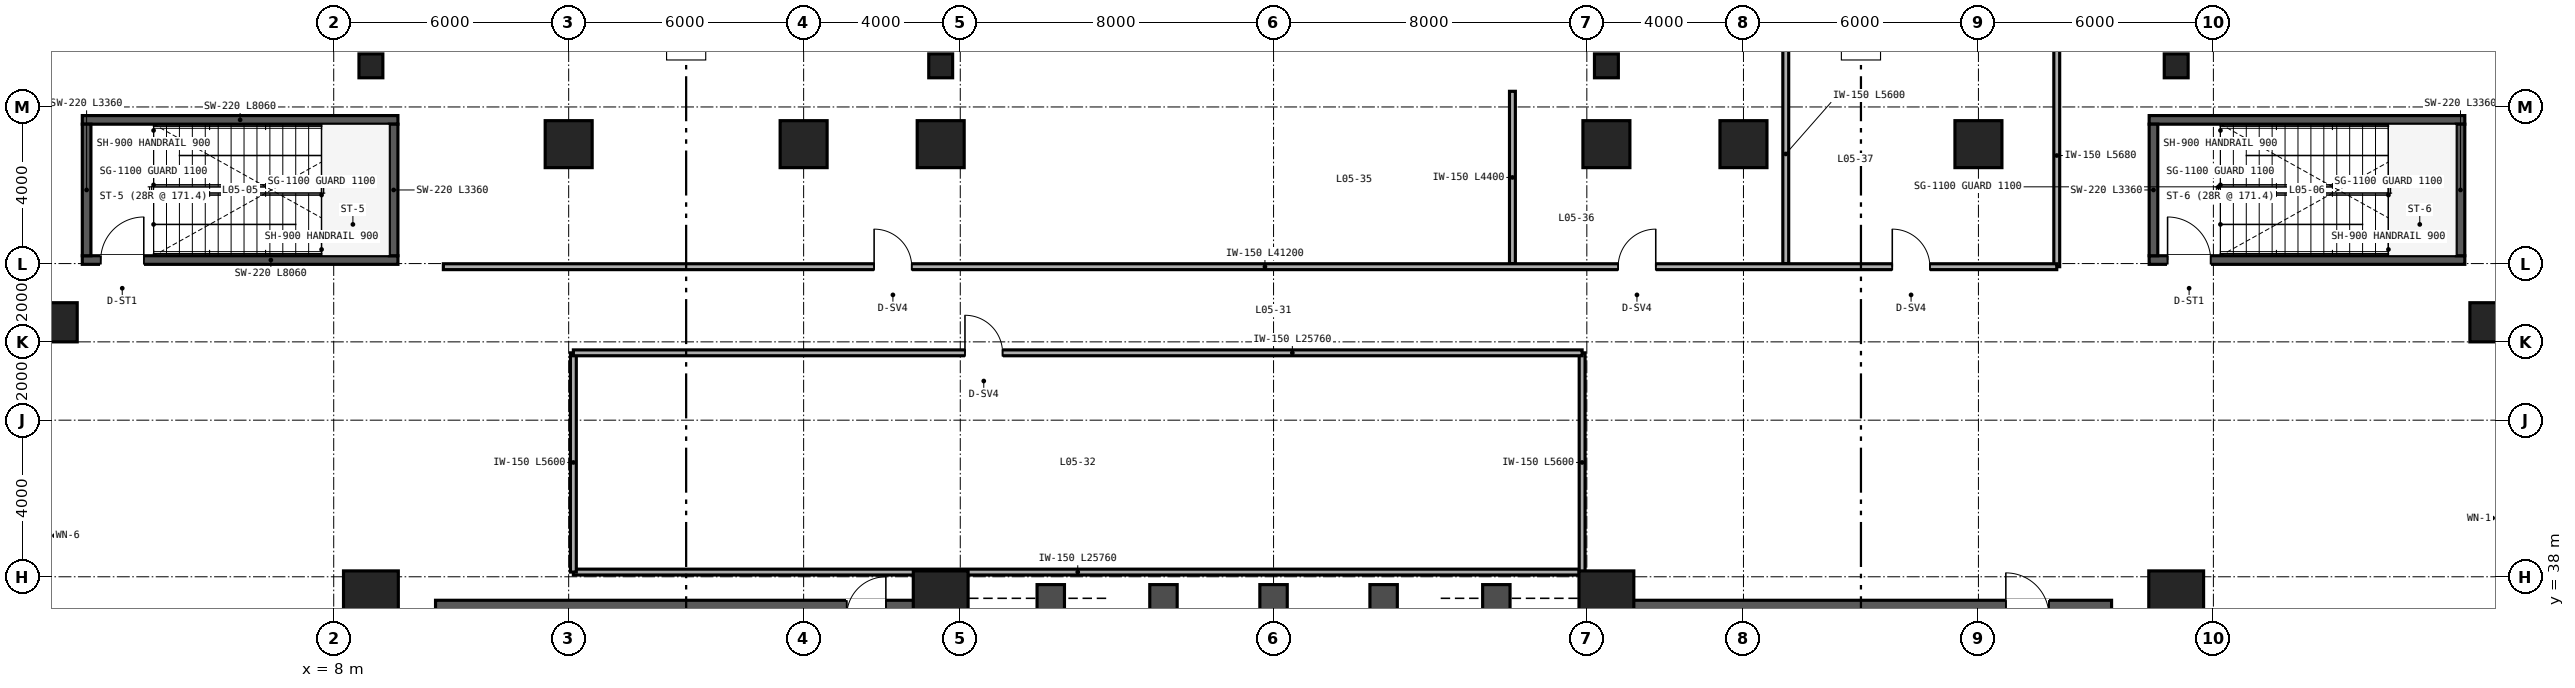
"""IFC4 building model, lengths in metres.
Left out: names, types, materials, properties, quantities, classifications, styles, units other than length and angle.
Written with IfcOpenShell. Run it as: python <this file> out.ifc"""

import sys

from ifc_helpers import new_model, si_unit, direction, frame, frame_2d, origin, origin_2d, place, context, subcontext, project, spatial, rectangle, hollow_circle, extrude, source, transform, mapped, element, fill, save


model = new_model("IFC4")
c1 = context("Model", 3, precision=1e-05, world=origin(), true_north=direction((0.0, 1.0)))
c2 = subcontext(c1, "Body", "Model", "MODEL_VIEW")
j1 = project(units=[si_unit("LENGTHUNIT", "METRE"), si_unit("PLANEANGLEUNIT", "RADIAN")], contexts=[c1])
p1 = place(None, origin())
s1 = spatial("IfcSite", under=j1, at=p1, CompositionType="ELEMENT")
p2 = place(p1, origin())
s2 = spatial("IfcBuilding", under=s1, at=p2, CompositionType="ELEMENT")
p3 = place(p2, frame((0.0, 0.0, 24.0)))
s3 = spatial("IfcBuildingStorey", under=s2, at=p3, CompositionType="ELEMENT", Elevation=24.0)
p4 = place(p3, frame((10.6, 37.0, 0.0), z_axis=(0.0, 0.0, 1.0), x_axis=(1.0, 0.0, 0.0)))
e1 = element("IfcWall", 1, at=p4, inside=s3, PredefinedType="SHEAR", context=c2, shape_type="SweptSolid", body=[
    extrude(rectangle(XDim=12.8, YDim=0.8, at=frame_2d((6.4, 0.0))), origin(), (0.0, 0.0, 1.0), 4.48),
])
p5 = place(p4, frame((10.5, 0.0, 0.0)))
e2 = element("IfcOpeningElement", 2, at=p5, cuts=e1, PredefinedType="OPENING", context=c2, shape_type="SweptSolid", body=[
    extrude(rectangle(XDim=1.0, YDim=2.15, at=frame_2d((0.5, 1.075))), frame((0.0, 0.41, 0.0), z_axis=(0.0, -1.0, 0.0), x_axis=(1.0, 0.0, 0.0)), (0.0, 0.0, 1.0), 0.82),
])
p6 = place(p3, frame((40.6, 37.0, 0.0), z_axis=(0.0, 0.0, 1.0), x_axis=(1.0, 0.0, 0.0)))
e3 = element("IfcWall", 3, at=p6, inside=s3, PredefinedType="SHEAR", context=c2, shape_type="SweptSolid", body=[
    extrude(rectangle(XDim=12.8, YDim=0.8, at=frame_2d((6.4, 0.0))), origin(), (0.0, 0.0, 1.0), 4.48),
])
p7 = place(p6, frame((10.1, 0.0, 0.0)))
e4 = element("IfcOpeningElement", 4, at=p7, cuts=e3, PredefinedType="OPENING", context=c2, shape_type="SweptSolid", body=[
    extrude(rectangle(XDim=1.1, YDim=2.15, at=frame_2d((0.55, 1.075))), frame((0.0, 0.41, 0.0), z_axis=(0.0, -1.0, 0.0), x_axis=(1.0, 0.0, 0.0)), (0.0, 0.0, 1.0), 0.82),
])
p8 = place(p3, frame((1.58, 46.09, 0.0), z_axis=(0.0, 0.0, 1.0), x_axis=(1.0, 0.0, 0.0)))
e5 = element("IfcWall", 5, at=p8, inside=s3, PredefinedType="SHEAR", context=c2, shape_type="SweptSolid", body=[
    extrude(rectangle(XDim=8.06, YDim=0.22, at=frame_2d((4.03, 0.0))), origin(), (0.0, 0.0, 1.0), 4.6),
])
p9 = place(p8, frame((0.47, 0.0, 0.0)))
e6 = element("IfcOpeningElement", 6, at=p9, cuts=e5, PredefinedType="OPENING", context=c2, shape_type="SweptSolid", body=[
    extrude(rectangle(XDim=1.1, YDim=2.15, at=frame_2d((0.55, 1.075))), frame((0.0, 0.12, 0.0), z_axis=(0.0, -1.0, 0.0), x_axis=(1.0, 0.0, 0.0)), (0.0, 0.0, 1.0), 0.24),
])
p10 = place(p3, frame((1.58, 49.67, 0.0), z_axis=(0.0, 0.0, 1.0), x_axis=(1.0, 0.0, 0.0)))
e7 = element("IfcWall", 7, at=p10, inside=s3, PredefinedType="SHEAR", context=c2, shape_type="SweptSolid", body=[
    extrude(rectangle(XDim=8.06, YDim=0.22, at=frame_2d((4.03, 0.0))), origin(), (0.0, 0.0, 1.0), 4.6),
])
for number, where, z_axis, x_axis in (
    (8, (1.69, 46.2, 0.0), (0.0, 0.0, 1.0), (0.0, 1.0, 0.0)),
    (9, (9.53, 46.2, 0.0), (0.0, 0.0, 1.0), (0.0, 1.0, 0.0)),
):
    element("IfcWall", number, at=place(p3, frame(where, z_axis=z_axis, x_axis=x_axis)), inside=s3, PredefinedType="SHEAR", context=c2, shape_type="SweptSolid", body=[
        extrude(rectangle(XDim=3.36, YDim=0.22, at=frame_2d((1.68, 0.0))), origin(), (0.0, 0.0, 1.0), 4.6),
    ])
p11 = place(p3, frame((54.36, 46.09, 0.0), z_axis=(0.0, 0.0, 1.0), x_axis=(1.0, 0.0, 0.0)))
e10 = element("IfcWall", 10, at=p11, inside=s3, PredefinedType="SHEAR", context=c2, shape_type="SweptSolid", body=[
    extrude(rectangle(XDim=8.06, YDim=0.22, at=frame_2d((4.03, 0.0))), origin(), (0.0, 0.0, 1.0), 4.6),
])
p12 = place(p11, frame((0.47, 0.0, 0.0)))
e11 = element("IfcOpeningElement", 11, at=p12, cuts=e10, PredefinedType="OPENING", context=c2, shape_type="SweptSolid", body=[
    extrude(rectangle(XDim=1.1, YDim=2.15, at=frame_2d((0.55, 1.075))), frame((0.0, 0.12, 0.0), z_axis=(0.0, -1.0, 0.0), x_axis=(1.0, 0.0, 0.0)), (0.0, 0.0, 1.0), 0.24),
])
p13 = place(p3, frame((54.36, 49.67, 0.0), z_axis=(0.0, 0.0, 1.0), x_axis=(1.0, 0.0, 0.0)))
e12 = element("IfcWall", 12, at=p13, inside=s3, PredefinedType="SHEAR", context=c2, shape_type="SweptSolid", body=[
    extrude(rectangle(XDim=8.06, YDim=0.22, at=frame_2d((4.03, 0.0))), origin(), (0.0, 0.0, 1.0), 4.6),
])
for number, where, z_axis, x_axis in (
    (13, (54.47, 46.2, 0.0), (0.0, 0.0, 1.0), (0.0, 1.0, 0.0)),
    (14, (62.31, 46.2, 0.0), (0.0, 0.0, 1.0), (0.0, 1.0, 0.0)),
):
    element("IfcWall", number, at=place(p3, frame(where, z_axis=z_axis, x_axis=x_axis)), inside=s3, PredefinedType="SHEAR", context=c2, shape_type="SweptSolid", body=[
        extrude(rectangle(XDim=3.36, YDim=0.22, at=frame_2d((1.68, 0.0))), origin(), (0.0, 0.0, 1.0), 4.6),
    ])
m1 = source(origin(), c2, "Body", "SweptSolid", [
    extrude(rectangle(XDim=1.0, YDim=1.0, at=origin_2d()), origin(), (0.0, 0.0, 1.0), 4.48),
])
for number, where, z_axis, x_axis in (
    (15, (0.95, 44.5, 0.0), (0.0, 0.0, 1.0), (1.0, 0.0, 0.0)),
    (16, (63.05, 44.5, 0.0), (0.0, 0.0, 1.0), (1.0, 0.0, 0.0)),
):
    element("IfcColumn", number, at=place(p3, frame(where, z_axis=z_axis, x_axis=x_axis)), inside=s3, PredefinedType="COLUMN", context=c2, shape_type="MappedRepresentation", body=[
        mapped(m1, transform((0.0, 0.0, 0.0), scale=1.0)),
    ])
m2 = source(origin(), c2, "Body", "SweptSolid", [
    extrude(hollow_circle(Radius=0.305, WallThickness=0.025, at=origin_2d()), origin(), (0.0, 0.0, 1.0), 4.48),
])
for number, where, z_axis, x_axis in (
    (17, (8.95, 51.05, 0.0), (0.0, 0.0, 1.0), (1.0, 0.0, 0.0)),
    (18, (23.5, 51.05, 0.0), (0.0, 0.0, 1.0), (1.0, 0.0, 0.0)),
    (19, (40.5, 51.05, 0.0), (0.0, 0.0, 1.0), (1.0, 0.0, 0.0)),
    (20, (55.05, 51.05, 0.0), (0.0, 0.0, 1.0), (1.0, 0.0, 0.0)),
):
    element("IfcColumn", number, at=place(p3, frame(where, z_axis=z_axis, x_axis=x_axis)), inside=s3, PredefinedType="COLUMN", context=c2, shape_type="MappedRepresentation", body=[
        mapped(m2, transform((0.0, 0.0, 0.0), scale=1.0)),
    ])
m3 = source(origin(), c2, "Body", "SweptSolid", [
    extrude(rectangle(XDim=1.4, YDim=1.4, at=origin_2d()), origin(), (0.0, 0.0, 1.0), 4.48),
])
for number, where, z_axis, x_axis in (
    (21, (8.95, 37.45, 0.0), (0.0, 0.0, 1.0), (1.0, 0.0, 0.0)),
    (22, (23.5, 37.45, 0.0), (0.0, 0.0, 1.0), (1.0, 0.0, 0.0)),
    (23, (40.5, 37.45, 0.0), (0.0, 0.0, 1.0), (1.0, 0.0, 0.0)),
    (24, (55.05, 37.45, 0.0), (0.0, 0.0, 1.0), (1.0, 0.0, 0.0)),
):
    element("IfcColumn", number, at=place(p3, frame(where, z_axis=z_axis, x_axis=x_axis)), inside=s3, PredefinedType="COLUMN", context=c2, shape_type="MappedRepresentation", body=[
        mapped(m3, transform((0.0, 0.0, 0.0), scale=1.0)),
    ])
m4 = source(origin(), c2, "Body", "SweptSolid", [
    extrude(rectangle(XDim=1.2, YDim=1.2, at=origin_2d()), origin(), (0.0, 0.0, 1.0), 4.48),
])
for number, where, z_axis, x_axis in (
    (25, (14.0, 49.05, 0.0), (0.0, 0.0, 1.0), (1.0, 0.0, 0.0)),
    (26, (20.0, 49.05, 0.0), (0.0, 0.0, 1.0), (1.0, 0.0, 0.0)),
    (27, (23.5, 49.05, 0.0), (0.0, 0.0, 1.0), (1.0, 0.0, 0.0)),
    (28, (40.5, 49.05, 0.0), (0.0, 0.0, 1.0), (1.0, 0.0, 0.0)),
    (29, (44.0, 49.05, 0.0), (0.0, 0.0, 1.0), (1.0, 0.0, 0.0)),
    (30, (50.0, 49.05, 0.0), (0.0, 0.0, 1.0), (1.0, 0.0, 0.0)),
):
    element("IfcColumn", number, at=place(p3, frame(where, z_axis=z_axis, x_axis=x_axis)), inside=s3, PredefinedType="COLUMN", context=c2, shape_type="MappedRepresentation", body=[
        mapped(m4, transform((0.0, 0.0, 0.0), scale=1.0)),
    ])
p14 = place(p3, frame((14.12, 38.12, 0.0), z_axis=(0.0, 0.0, 1.0), x_axis=(1.0, 0.0, 0.0)))
e31 = element("IfcWall", 31, at=p14, inside=s3, PredefinedType="PARTITIONING", context=c2, shape_type="SweptSolid", body=[
    extrude(rectangle(XDim=25.76, YDim=0.15, at=frame_2d((12.88, 0.0))), origin(), (0.0, 0.0, 1.0), 3.701),
])
for number, where, z_axis, x_axis in (
    (32, (14.12, 38.12, 0.0), (0.0, 0.0, 1.0), (0.0, 1.0, 0.0)),
    (33, (39.88, 38.12, 0.0), (0.0, 0.0, 1.0), (0.0, 1.0, 0.0)),
):
    element("IfcWall", number, at=place(p3, frame(where, z_axis=z_axis, x_axis=x_axis)), inside=s3, PredefinedType="PARTITIONING", context=c2, shape_type="SweptSolid", body=[
        extrude(rectangle(XDim=5.6, YDim=0.15, at=frame_2d((2.8, 0.0))), origin(), (0.0, 0.0, 1.0), 4.48),
    ])
p15 = place(p3, frame((14.12, 43.72, 0.0), z_axis=(0.0, 0.0, 1.0), x_axis=(1.0, 0.0, 0.0)))
e34 = element("IfcWall", 34, at=p15, inside=s3, PredefinedType="PARTITIONING", context=c2, shape_type="SweptSolid", body=[
    extrude(rectangle(XDim=25.76, YDim=0.15, at=frame_2d((12.88, 0.0))), origin(), (0.0, 0.0, 1.0), 3.701),
])
p16 = place(p15, frame((10.0, 0.0, 0.0)))
e35 = element("IfcOpeningElement", 35, at=p16, cuts=e34, PredefinedType="OPENING", context=c2, shape_type="SweptSolid", body=[
    extrude(rectangle(XDim=0.96, YDim=2.15, at=frame_2d((0.48, 1.075))), frame((0.0, 0.085, 0.0), z_axis=(0.0, -1.0, 0.0), x_axis=(1.0, 0.0, 0.0)), (0.0, 0.0, 1.0), 0.17),
])
p17 = place(p3, frame((38.1, 46.0, 0.0), z_axis=(0.0, 0.0, 1.0), x_axis=(0.0, 1.0, 0.0)))
e36 = element("IfcWall", 36, at=p17, inside=s3, PredefinedType="PARTITIONING", context=c2, shape_type="SweptSolid", body=[
    extrude(rectangle(XDim=4.4, YDim=0.15, at=frame_2d((2.2, 0.0))), origin(), (0.0, 0.0, 1.0), 3.532),
])
p18 = place(p3, frame((45.08, 46.0, 0.0), z_axis=(0.0, 0.0, 1.0), x_axis=(0.0, 1.0, 0.0)))
e37 = element("IfcWall", 37, at=p18, inside=s3, PredefinedType="PARTITIONING", context=c2, shape_type="SweptSolid", body=[
    extrude(rectangle(XDim=5.6, YDim=0.15, at=frame_2d((2.8, 0.0))), origin(), (0.0, 0.0, 1.0), 3.553),
])
p19 = place(p3, frame((52.0, 45.92, 0.0), z_axis=(0.0, 0.0, 1.0), x_axis=(0.0, 1.0, 0.0)))
e38 = element("IfcWall", 38, at=p19, inside=s3, PredefinedType="PARTITIONING", context=c2, shape_type="SweptSolid", body=[
    extrude(rectangle(XDim=5.68, YDim=0.15, at=frame_2d((2.84, 0.0))), origin(), (0.0, 0.0, 1.0), 3.553),
])
p20 = place(p3, frame((10.8, 45.92, 0.0), z_axis=(0.0, 0.0, 1.0), x_axis=(1.0, 0.0, 0.0)))
e39 = element("IfcWall", 39, at=p20, inside=s3, PredefinedType="PARTITIONING", context=c2, shape_type="SweptSolid", body=[
    extrude(rectangle(XDim=41.2, YDim=0.15, at=frame_2d((20.6, 0.0))), origin(), (0.0, 0.0, 1.0), 3.701),
])
p21 = place(p20, frame((11.0, 0.0, 0.0)))
e40 = element("IfcOpeningElement", 40, at=p21, cuts=e39, PredefinedType="OPENING", context=c2, shape_type="SweptSolid", body=[
    extrude(rectangle(XDim=0.96, YDim=2.15, at=frame_2d((0.48, 1.075))), frame((0.0, 0.085, 0.0), z_axis=(0.0, -1.0, 0.0), x_axis=(1.0, 0.0, 0.0)), (0.0, 0.0, 1.0), 0.17),
])
p22 = place(p20, frame((30.0, 0.0, 0.0)))
e41 = element("IfcOpeningElement", 41, at=p22, cuts=e39, PredefinedType="OPENING", context=c2, shape_type="SweptSolid", body=[
    extrude(rectangle(XDim=0.96, YDim=2.15, at=frame_2d((0.48, 1.075))), frame((0.0, 0.085, 0.0), z_axis=(0.0, -1.0, 0.0), x_axis=(1.0, 0.0, 0.0)), (0.0, 0.0, 1.0), 0.17),
])
p23 = place(p20, frame((37.0, 0.0, 0.0)))
e42 = element("IfcOpeningElement", 42, at=p23, cuts=e39, PredefinedType="OPENING", context=c2, shape_type="SweptSolid", body=[
    extrude(rectangle(XDim=0.96, YDim=2.15, at=frame_2d((0.48, 1.075))), frame((0.0, 0.085, 0.0), z_axis=(0.0, -1.0, 0.0), x_axis=(1.0, 0.0, 0.0)), (0.0, 0.0, 1.0), 0.17),
])
m5 = source(origin(), c2, "Body", "SweptSolid", [
    extrude(rectangle(XDim=1.1, YDim=2.15, at=frame_2d((0.55, 1.075))), frame((0.0, 0.025, 0.0), z_axis=(0.0, -1.0, 0.0), x_axis=(1.0, 0.0, 0.0)), (0.0, 0.0, 1.0), 0.05),
])
p24 = place(p9, origin())
e43 = element("IfcDoor", 43, at=p24, inside=s3, OperationType="SINGLE_SWING_RIGHT", PredefinedType="DOOR", context=c2, shape_type="MappedRepresentation", body=[
    mapped(m5, transform((0.0, 0.0, 0.0), scale=1.0)),
])
fill(e6, e43)
p25 = place(p12, origin())
e44 = element("IfcDoor", 44, at=p25, inside=s3, OperationType="SINGLE_SWING_LEFT", PredefinedType="DOOR", context=c2, shape_type="MappedRepresentation", body=[
    mapped(m5, transform((0.0, 0.0, 0.0), scale=1.0)),
])
fill(e11, e44)
m6 = source(origin(), c2, "Body", "SweptSolid", [
    extrude(rectangle(XDim=0.96, YDim=2.15, at=frame_2d((0.48, 1.075))), frame((0.0, 0.025, 0.0), z_axis=(0.0, -1.0, 0.0), x_axis=(1.0, 0.0, 0.0)), (0.0, 0.0, 1.0), 0.05),
])
p26 = place(p16, origin())
e45 = element("IfcDoor", 45, at=p26, inside=s3, OperationType="SINGLE_SWING_LEFT", PredefinedType="DOOR", context=c2, shape_type="MappedRepresentation", body=[
    mapped(m6, transform((0.0, 0.0, 0.0), scale=1.0)),
])
fill(e35, e45)
p27 = place(p21, origin())
e46 = element("IfcDoor", 46, at=p27, inside=s3, OperationType="SINGLE_SWING_LEFT", PredefinedType="DOOR", context=c2, shape_type="MappedRepresentation", body=[
    mapped(m6, transform((0.0, 0.0, 0.0), scale=1.0)),
])
fill(e40, e46)
p28 = place(p22, origin())
e47 = element("IfcDoor", 47, at=p28, inside=s3, OperationType="SINGLE_SWING_RIGHT", PredefinedType="DOOR", context=c2, shape_type="MappedRepresentation", body=[
    mapped(m6, transform((0.0, 0.0, 0.0), scale=1.0)),
])
fill(e41, e47)
p29 = place(p23, origin())
e48 = element("IfcDoor", 48, at=p29, inside=s3, OperationType="SINGLE_SWING_LEFT", PredefinedType="DOOR", context=c2, shape_type="MappedRepresentation", body=[
    mapped(m6, transform((0.0, 0.0, 0.0), scale=1.0)),
])
fill(e42, e48)
save(model, sys.argv[1])
